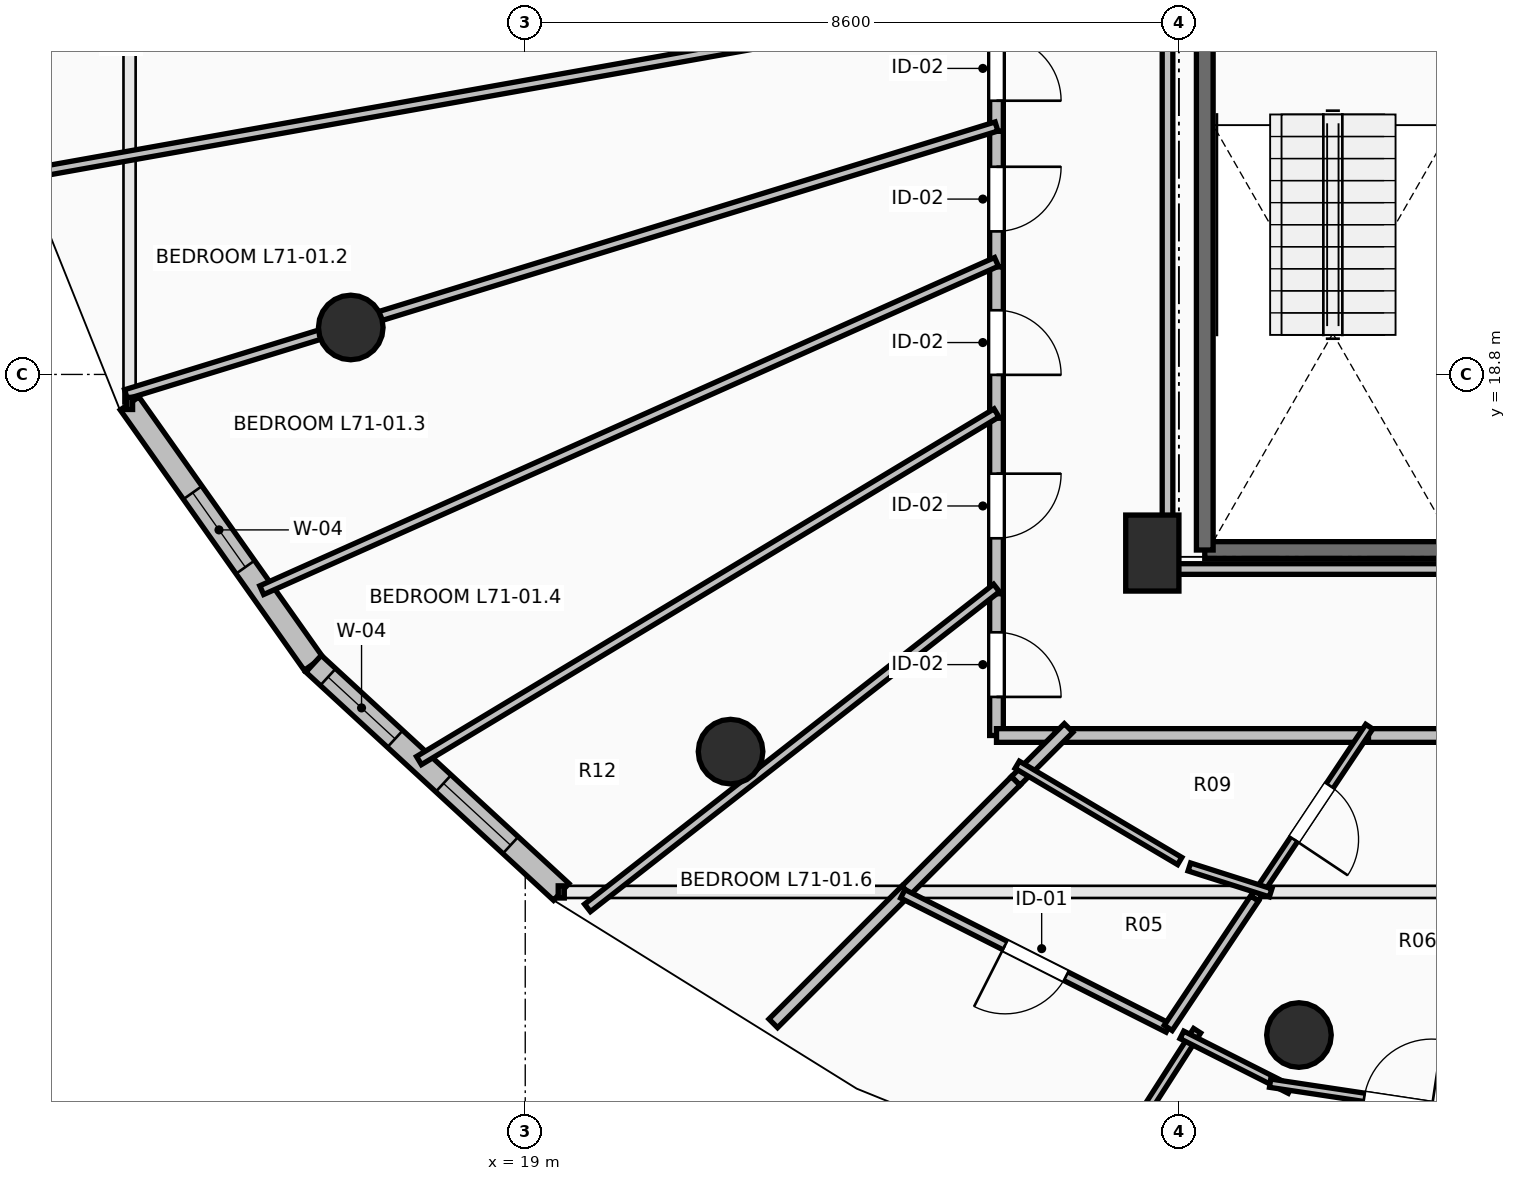
"""IFC4 building model, lengths in metres.
Left out: names, types, materials, properties, quantities, classifications, styles, units other than length and angle.
Written with IfcOpenShell. Run it as: python <this file> out.ifc"""

import sys

from ifc_helpers import new_model, si_unit, direction, frame, frame_2d, origin, origin_2d, place, context, subcontext, project, spatial, rectangle, circle, extrude, element, fill, save


model = new_model("IFC4")
c1 = context("Model", 3, precision=1e-05, world=origin(), true_north=direction((0.0, 1.0)))
c2 = subcontext(c1, "Body", "Model", "MODEL_VIEW")
j1 = project(units=[si_unit("LENGTHUNIT", "METRE"), si_unit("PLANEANGLEUNIT", "RADIAN")], contexts=[c1])
p1 = place(None, origin())
s1 = spatial("IfcSite", under=j1, at=p1, CompositionType="ELEMENT")
p2 = place(p1, origin())
s2 = spatial("IfcBuilding", under=s1, at=p2, CompositionType="ELEMENT")
p3 = place(p2, frame((0.0, 0.0, 262.65)))
s3 = spatial("IfcBuildingStorey", under=s2, at=p3, CompositionType="ELEMENT", Elevation=262.65)
for number, where, z_axis, x_axis in (
    (1, (16.705, 19.418, 0.0), (0.0, 0.0, 1.0), (-0.924, -0.383, 0.0)),
    (2, (21.701, 13.838, 0.0), (0.0, 0.0, 1.0), (-0.707, -0.707, 0.0)),
    (3, (29.179, 10.109, 0.0), (0.0, 0.0, 1.0), (-0.383, -0.924, 0.0)),
):
    element("IfcColumn", number, at=place(p3, frame(where, z_axis=z_axis, x_axis=x_axis)), inside=s3, PredefinedType="COLUMN", context=c2, shape_type="SweptSolid", body=[
        extrude(circle(Radius=0.425, at=origin_2d()), origin(), (0.0, 0.0, 1.0), 3.55),
    ])
p4 = place(p3, frame((27.25, 16.45, 0.0), z_axis=(0.0, 0.0, 1.0), x_axis=(1.0, 0.0, 0.0)))
e4 = element("IfcColumn", 4, at=p4, inside=s3, PredefinedType="PILASTER", context=c2, shape_type="SweptSolid", body=[
    extrude(rectangle(XDim=0.7, YDim=1.0, at=origin_2d()), origin(), (0.0, 0.0, 1.0), 3.55),
])
p5 = place(p3, frame((13.794, 18.419, 0.0), z_axis=(0.0, 0.0, 1.0), x_axis=(0.577261247247, -0.816559521668, 0.0)))
e5 = element("IfcWall", 5, at=p5, inside=s3, PredefinedType="STANDARD", context=c2, shape_type="SweptSolid", body=[
    extrude(rectangle(XDim=4.194, YDim=0.3, at=frame_2d((2.097, 0.0))), origin(), (0.0, 0.0, 1.0), 3.29),
])
p6 = place(p5, frame((1.438, 0.0, 0.85)))
e6 = element("IfcOpeningElement", 6, at=p6, cuts=e5, PredefinedType="OPENING", context=c2, shape_type="SweptSolid", body=[
    extrude(rectangle(XDim=1.2, YDim=1.95, at=frame_2d((0.6, 0.975))), frame((0.0, 0.165, 0.0), z_axis=(0.0, -1.0, 0.0), x_axis=(1.0, 0.0, 0.0)), (0.0, 0.0, 1.0), 0.33),
])
p7 = place(p3, frame((16.216, 14.994, 0.0), z_axis=(0.0, 0.0, 1.0), x_axis=(0.735445373611, -0.677584018727, 0.0)))
e7 = element("IfcWall", 7, at=p7, inside=s3, PredefinedType="STANDARD", context=c2, shape_type="SweptSolid", body=[
    extrude(rectangle(XDim=4.43, YDim=0.3, at=frame_2d((2.215, 0.0))), origin(), (0.0, 0.0, 1.0), 3.29),
])
p8 = place(p7, frame((0.258, 0.0, 0.85)))
e8 = element("IfcOpeningElement", 8, at=p8, cuts=e7, PredefinedType="OPENING", context=c2, shape_type="SweptSolid", body=[
    extrude(rectangle(XDim=1.2, YDim=1.95, at=frame_2d((0.6, 0.975))), frame((0.0, 0.165, 0.0), z_axis=(0.0, -1.0, 0.0), x_axis=(1.0, 0.0, 0.0)), (0.0, 0.0, 1.0), 0.33),
])
p9 = place(p7, frame((2.323, 0.0, 0.85)))
e9 = element("IfcOpeningElement", 9, at=p9, cuts=e7, PredefinedType="OPENING", context=c2, shape_type="SweptSolid", body=[
    extrude(rectangle(XDim=1.2, YDim=1.95, at=frame_2d((0.6, 0.975))), frame((0.0, 0.165, 0.0), z_axis=(0.0, -1.0, 0.0), x_axis=(1.0, 0.0, 0.0)), (0.0, 0.0, 1.0), 0.33),
])
p10 = place(p3, frame((31.31, 16.49, 0.0), z_axis=(0.0, 0.0, 1.0), x_axis=(-1.0, 0.0, 0.0)))
e10 = element("IfcWall", 10, at=p10, inside=s3, PredefinedType="SOLIDWALL", context=c2, shape_type="SweptSolid", body=[
    extrude(rectangle(XDim=3.37, YDim=0.22, at=frame_2d((1.685, 0.0))), origin(), (0.0, 0.0, 1.0), 3.29),
])
p11 = place(p3, frame((27.94, 16.49, 0.0), z_axis=(0.0, 0.0, 1.0), x_axis=(0.0, 1.0, 0.0)))
e11 = element("IfcWall", 11, at=p11, inside=s3, PredefinedType="SOLIDWALL", context=c2, shape_type="SweptSolid", body=[
    extrude(rectangle(XDim=7.42, YDim=0.22, at=frame_2d((3.71, 0.0))), origin(), (0.0, 0.0, 1.0), 3.29),
])
p12 = place(p3, frame((25.2, 23.653, 0.0), z_axis=(0.0, 0.0, 1.0), x_axis=(0.0, -1.0, 0.0)))
e12 = element("IfcWall", 12, at=p12, inside=s3, PredefinedType="PARTITIONING", context=c2, shape_type="SweptSolid", body=[
    extrude(rectangle(XDim=1.654, YDim=0.18, at=frame_2d((0.827, 0.0))), origin(), (0.0, 0.0, 1.0), 3.29),
])
p13 = place(p12, frame((0.402, 0.0, 0.0)))
e13 = element("IfcOpeningElement", 13, at=p13, cuts=e12, PredefinedType="OPENING", context=c2, shape_type="SweptSolid", body=[
    extrude(rectangle(XDim=0.85, YDim=2.1, at=frame_2d((0.425, 1.05))), frame((0.0, 0.105, 0.0), z_axis=(0.0, -1.0, 0.0), x_axis=(1.0, 0.0, 0.0)), (0.0, 0.0, 1.0), 0.21),
])
p14 = place(p3, frame((25.2, 21.999, 0.0), z_axis=(0.0, 0.0, 1.0), x_axis=(0.0, -1.0, 0.0)))
e14 = element("IfcWall", 14, at=p14, inside=s3, PredefinedType="PARTITIONING", context=c2, shape_type="SweptSolid", body=[
    extrude(rectangle(XDim=1.784, YDim=0.18, at=frame_2d((0.892, 0.0))), origin(), (0.0, 0.0, 1.0), 3.29),
])
p15 = place(p14, frame((0.467, 0.0, 0.0)))
e15 = element("IfcOpeningElement", 15, at=p15, cuts=e14, PredefinedType="OPENING", context=c2, shape_type="SweptSolid", body=[
    extrude(rectangle(XDim=0.85, YDim=2.1, at=frame_2d((0.425, 1.05))), frame((0.0, 0.105, 0.0), z_axis=(0.0, -1.0, 0.0), x_axis=(1.0, 0.0, 0.0)), (0.0, 0.0, 1.0), 0.21),
])
p16 = place(p3, frame((25.2, 20.215, 0.0), z_axis=(0.0, 0.0, 1.0), x_axis=(0.0, -1.0, 0.0)))
e16 = element("IfcWall", 16, at=p16, inside=s3, PredefinedType="PARTITIONING", context=c2, shape_type="SweptSolid", body=[
    extrude(rectangle(XDim=1.991, YDim=0.18, at=frame_2d((0.996, 0.0))), origin(), (0.0, 0.0, 1.0), 3.29),
])
p17 = place(p16, frame((0.571, 0.0, 0.0)))
e17 = element("IfcOpeningElement", 17, at=p17, cuts=e16, PredefinedType="OPENING", context=c2, shape_type="SweptSolid", body=[
    extrude(rectangle(XDim=0.85, YDim=2.1, at=frame_2d((0.425, 1.05))), frame((0.0, 0.105, 0.0), z_axis=(0.0, -1.0, 0.0), x_axis=(1.0, 0.0, 0.0)), (0.0, 0.0, 1.0), 0.21),
])
p18 = place(p3, frame((25.2, 18.224, 0.0), z_axis=(0.0, 0.0, 1.0), x_axis=(0.0, -1.0, 0.0)))
e18 = element("IfcWall", 18, at=p18, inside=s3, PredefinedType="PARTITIONING", context=c2, shape_type="SweptSolid", body=[
    extrude(rectangle(XDim=2.309, YDim=0.18, at=frame_2d((1.155, 0.0))), origin(), (0.0, 0.0, 1.0), 2.482),
])
p19 = place(p18, frame((0.729, 0.0, 0.0)))
e19 = element("IfcOpeningElement", 19, at=p19, cuts=e18, PredefinedType="OPENING", context=c2, shape_type="SweptSolid", body=[
    extrude(rectangle(XDim=0.85, YDim=2.1, at=frame_2d((0.425, 1.05))), frame((0.0, 0.105, 0.0), z_axis=(0.0, -1.0, 0.0), x_axis=(1.0, 0.0, 0.0)), (0.0, 0.0, 1.0), 0.21),
])
p20 = place(p3, frame((25.2, 15.915, 0.0), z_axis=(0.0, 0.0, 1.0), x_axis=(0.0, -1.0, 0.0)))
e20 = element("IfcWall", 20, at=p20, inside=s3, PredefinedType="PARTITIONING", context=c2, shape_type="SweptSolid", body=[
    extrude(rectangle(XDim=1.865, YDim=0.18, at=frame_2d((0.933, 0.0))), origin(), (0.0, 0.0, 1.0), 2.482),
])
p21 = place(p20, frame((0.508, 0.0, 0.0)))
e21 = element("IfcOpeningElement", 21, at=p21, cuts=e20, PredefinedType="OPENING", context=c2, shape_type="SweptSolid", body=[
    extrude(rectangle(XDim=0.85, YDim=2.1, at=frame_2d((0.425, 1.05))), frame((0.0, 0.105, 0.0), z_axis=(0.0, -1.0, 0.0), x_axis=(1.0, 0.0, 0.0)), (0.0, 0.0, 1.0), 0.21),
])
p22 = place(p3, frame((25.2, 14.05, 0.0), z_axis=(0.0, 0.0, 1.0), x_axis=(1.0, 0.0, 0.0)))
e22 = element("IfcWall", 22, at=p22, inside=s3, PredefinedType="PARTITIONING", context=c2, shape_type="SweptSolid", body=[
    extrude(rectangle(XDim=0.91, YDim=0.18, at=frame_2d((0.455, 0.0))), origin(), (0.0, 0.0, 1.0), 3.022),
])
p23 = place(p3, frame((29.954, 14.05, 0.0), z_axis=(0.0, 0.0, 1.0), x_axis=(1.0, 0.0, 0.0)))
e23 = element("IfcWall", 23, at=p23, inside=s3, PredefinedType="PARTITIONING", context=c2, shape_type="SweptSolid", body=[
    extrude(rectangle(XDim=3.909, YDim=0.18, at=frame_2d((1.955, 0.0))), origin(), (0.0, 0.0, 1.0), 2.936),
])
p24 = place(p23, frame((1.455, 0.0, 0.0)))
e24 = element("IfcOpeningElement", 24, at=p24, cuts=e23, PredefinedType="OPENING", context=c2, shape_type="SweptSolid", body=[
    extrude(rectangle(XDim=1.0, YDim=2.15, at=frame_2d((0.5, 1.075))), frame((0.0, 0.105, 0.0), z_axis=(0.0, -1.0, 0.0), x_axis=(1.0, 0.0, 0.0)), (0.0, 0.0, 1.0), 0.21),
])
p25 = place(p3, frame((25.97, 14.05, 0.0), z_axis=(0.0, 0.0, 1.0), x_axis=(1.0, 0.0, 0.0)))
e25 = element("IfcWall", 25, at=p25, inside=s3, PredefinedType="PARTITIONING", context=c2, shape_type="SweptSolid", body=[
    extrude(rectangle(XDim=4.124, YDim=0.18, at=frame_2d((2.062, 0.0))), origin(), (0.0, 0.0, 1.0), 2.482),
])
p26 = place(p3, frame((12.577, 21.46, 0.0), z_axis=(0.0, 0.0, 1.0), x_axis=(0.984427104809, 0.175793274383, 0.0)))
e26 = element("IfcWall", 26, at=p26, inside=s3, PredefinedType="PARTITIONING", context=c2, shape_type="SweptSolid", body=[
    extrude(rectangle(XDim=12.823, YDim=0.125, at=frame_2d((6.411, 0.0))), origin(), (0.0, 0.0, 1.0), 2.874),
])
p27 = place(p3, frame((13.747, 18.539, 0.0), z_axis=(0.0, 0.0, 1.0), x_axis=(0.955802794564, 0.294008533725, 0.0)))
e27 = element("IfcWall", 27, at=p27, inside=s3, PredefinedType="PARTITIONING", context=c2, shape_type="SweptSolid", body=[
    extrude(rectangle(XDim=11.982, YDim=0.125, at=frame_2d((5.991, 0.0))), origin(), (0.0, 0.0, 1.0), 2.482),
])
p28 = place(p3, frame((15.533, 15.962, 0.0), z_axis=(0.0, 0.0, 1.0), x_axis=(0.913015836792, 0.407924112756, 0.0)))
e28 = element("IfcWall", 28, at=p28, inside=s3, PredefinedType="PARTITIONING", context=c2, shape_type="SweptSolid", body=[
    extrude(rectangle(XDim=10.588, YDim=0.125, at=frame_2d((5.294, 0.0))), origin(), (0.0, 0.0, 1.0), 2.482),
])
p29 = place(p3, frame((17.602, 13.72, 0.0), z_axis=(0.0, 0.0, 1.0), x_axis=(0.856734134601, 0.515758298633, 0.0)))
e29 = element("IfcWall", 29, at=p29, inside=s3, PredefinedType="PARTITIONING", context=c2, shape_type="SweptSolid", body=[
    extrude(rectangle(XDim=8.868, YDim=0.125, at=frame_2d((4.434, 0.0))), origin(), (0.0, 0.0, 1.0), 2.482),
])
p30 = place(p3, frame((19.819, 11.782, 0.0), z_axis=(0.0, 0.0, 1.0), x_axis=(0.78765580417, 0.61611552014, 0.0)))
e30 = element("IfcWall", 30, at=p30, inside=s3, PredefinedType="PARTITIONING", context=c2, shape_type="SweptSolid", body=[
    extrude(rectangle(XDim=6.832, YDim=0.125, at=frame_2d((3.416, 0.0))), origin(), (0.0, 0.0, 1.0), 2.482),
])
p31 = place(p3, frame((22.263, 10.263, 0.0), z_axis=(0.0, 0.0, 1.0), x_axis=(0.707106781187, 0.707106781187, 0.0)))
e31 = element("IfcWall", 31, at=p31, inside=s3, PredefinedType="PARTITIONING", context=c2, shape_type="SweptSolid", body=[
    extrude(rectangle(XDim=2.473, YDim=0.16, at=frame_2d((1.237, 0.0))), origin(), (0.0, 0.0, 1.0), 3.29),
])
p32 = place(p3, frame((25.452, 13.452, 0.0), z_axis=(0.0, 0.0, 1.0), x_axis=(0.707106781187, 0.707106781187, 0.0)))
e32 = element("IfcWall", 32, at=p32, inside=s3, PredefinedType="PARTITIONING", context=c2, shape_type="SweptSolid", body=[
    extrude(rectangle(XDim=0.986, YDim=0.16, at=frame_2d((0.493, 0.0))), origin(), (0.0, 0.0, 1.0), 3.022),
])
p33 = place(p3, frame((24.012, 12.012, 0.0), z_axis=(0.0, 0.0, 1.0), x_axis=(0.707106781187, 0.707106781187, 0.0)))
e33 = element("IfcWall", 33, at=p33, inside=s3, PredefinedType="PARTITIONING", context=c2, shape_type="SweptSolid", body=[
    extrude(rectangle(XDim=2.036, YDim=0.16, at=frame_2d((1.018, 0.0))), origin(), (0.0, 0.0, 1.0), 2.874),
])
p34 = place(p3, frame((30.104, 14.167, 0.0), z_axis=(0.0, 0.0, 1.0), x_axis=(-0.555011080332, -0.831842954354, 0.0)))
e34 = element("IfcWall", 34, at=p34, inside=s3, PredefinedType="PARTITIONING", context=c2, shape_type="SweptSolid", body=[
    extrude(rectangle(XDim=2.718, YDim=0.11, at=frame_2d((1.359, 0.0))), origin(), (0.0, 0.0, 1.0), 2.482),
])
p35 = place(p34, frame((0.934, 0.0, 0.0)))
e35 = element("IfcOpeningElement", 35, at=p35, cuts=e34, PredefinedType="OPENING", context=c2, shape_type="SweptSolid", body=[
    extrude(rectangle(XDim=0.85, YDim=2.1, at=frame_2d((0.425, 1.05))), frame((0.0, 0.07, 0.0), z_axis=(0.0, -1.0, 0.0), x_axis=(1.0, 0.0, 0.0)), (0.0, 0.0, 1.0), 0.14),
])
p36 = place(p3, frame((26.534, 8.132, 0.0), z_axis=(0.0, 0.0, 1.0), x_axis=(0.540114041626, 0.841591838149, 0.0)))
e36 = element("IfcWall", 36, at=p36, inside=s3, PredefinedType="PARTITIONING", context=c2, shape_type="SweptSolid", body=[
    extrude(rectangle(XDim=2.417, YDim=0.11, at=frame_2d((1.208, 0.0))), origin(), (0.0, 0.0, 1.0), 3.29),
])
p37 = place(p3, frame((27.639, 10.111, 0.0), z_axis=(0.0, 0.0, 1.0), x_axis=(0.892614165752, -0.45082141819, 0.0)))
e37 = element("IfcWall", 37, at=p37, inside=s3, PredefinedType="PARTITIONING", context=c2, shape_type="SweptSolid", body=[
    extrude(rectangle(XDim=1.595, YDim=0.11, at=frame_2d((0.798, 0.0))), origin(), (0.0, 0.0, 1.0), 3.29),
])
p38 = place(p3, frame((28.8, 9.476, 0.0), z_axis=(0.0, 0.0, 1.0), x_axis=(0.988903707347, -0.148557926731, 0.0)))
e38 = element("IfcWall", 38, at=p38, inside=s3, PredefinedType="PARTITIONING", context=c2, shape_type="SweptSolid", body=[
    extrude(rectangle(XDim=3.404, YDim=0.11, at=frame_2d((1.702, 0.0))), origin(), (0.0, 0.0, 1.0), 3.29),
])
p39 = place(p38, frame((1.252, 0.0, 0.0)))
e39 = element("IfcOpeningElement", 39, at=p39, cuts=e38, PredefinedType="OPENING", context=c2, shape_type="SweptSolid", body=[
    extrude(rectangle(XDim=0.9, YDim=2.1, at=frame_2d((0.45, 1.05))), frame((0.0, 0.07, 0.0), z_axis=(0.0, -1.0, 0.0), x_axis=(1.0, 0.0, 0.0)), (0.0, 0.0, 1.0), 0.14),
])
p40 = place(p3, frame((27.459, 10.203, 0.0), z_axis=(0.0, 0.0, 1.0), x_axis=(-0.892559828496, 0.450928988374, 0.0)))
e40 = element("IfcWall", 40, at=p40, inside=s3, PredefinedType="PARTITIONING", context=c2, shape_type="SweptSolid", body=[
    extrude(rectangle(XDim=3.912, YDim=0.125, at=frame_2d((1.956, 0.0))), origin(), (0.0, 0.0, 1.0), 3.29),
])
p41 = place(p40, frame((1.506, 0.0, 0.0)))
e41 = element("IfcOpeningElement", 41, at=p41, cuts=e40, PredefinedType="OPENING", context=c2, shape_type="SweptSolid", body=[
    extrude(rectangle(XDim=0.9, YDim=2.1, at=frame_2d((0.45, 1.05))), frame((0.0, 0.077, 0.0), z_axis=(0.0, -1.0, 0.0), x_axis=(1.0, 0.0, 0.0)), (0.0, 0.0, 1.0), 0.155),
])
p42 = place(p3, frame((28.595, 11.906, 0.0), z_axis=(0.0, 0.0, 1.0), x_axis=(-0.555085472594, -0.831793314541, 0.0)))
e42 = element("IfcWall", 42, at=p42, inside=s3, PredefinedType="PARTITIONING", context=c2, shape_type="SweptSolid", body=[
    extrude(rectangle(XDim=2.047, YDim=0.125, at=frame_2d((1.023, 0.0))), origin(), (0.0, 0.0, 1.0), 2.482),
])
p43 = place(p3, frame((25.472, 13.664, 0.0), z_axis=(0.0, 0.0, 1.0), x_axis=(0.860546797705, -0.509371386082, 0.0)))
e43 = element("IfcWall", 43, at=p43, inside=s3, PredefinedType="PARTITIONING", context=c2, shape_type="SweptSolid", body=[
    extrude(rectangle(XDim=2.485, YDim=0.11, at=frame_2d((1.242, 0.0))), origin(), (0.0, 0.0, 1.0), 3.022),
])
p44 = place(p3, frame((27.737, 12.321, 0.0), z_axis=(0.0, 0.0, 1.0), x_axis=(0.952754298981, -0.303742071127, 0.0)))
e44 = element("IfcWall", 44, at=p44, inside=s3, PredefinedType="PARTITIONING", context=c2, shape_type="SweptSolid", body=[
    extrude(rectangle(XDim=1.123, YDim=0.11, at=frame_2d((0.562, 0.0))), origin(), (0.0, 0.0, 1.0), 2.482),
])
p45 = place(p3, frame((27.45, 23.754, 0.0), z_axis=(0.0, 0.0, 1.0), x_axis=(0.0, -1.0, 0.0)))
e45 = element("IfcWall", 45, at=p45, inside=s3, PredefinedType="PARTITIONING", context=c2, shape_type="SweptSolid", body=[
    extrude(rectangle(XDim=7.514, YDim=0.14, at=frame_2d((3.757, 0.0))), origin(), (0.0, 0.0, 1.0), 2.482),
])
p46 = place(p3, frame((27.45, 16.24, 0.0), z_axis=(0.0, 0.0, 1.0), x_axis=(1.0, 0.0, 0.0)))
e46 = element("IfcWall", 46, at=p46, inside=s3, PredefinedType="PARTITIONING", context=c2, shape_type="SweptSolid", body=[
    extrude(rectangle(XDim=3.745, YDim=0.14, at=frame_2d((1.873, 0.0))), origin(), (0.0, 0.0, 1.0), 2.482),
])
p47 = place(p6, origin())
e47 = element("IfcWindow", 47, at=p47, inside=s3, PartitioningType="SINGLE_PANEL", PredefinedType="WINDOW", context=c2, shape_type="SweptSolid", body=[
    extrude(rectangle(XDim=1.2, YDim=1.95, at=frame_2d((0.6, 0.975))), frame((0.0, 0.03, 0.0), z_axis=(0.0, -1.0, 0.0), x_axis=(1.0, 0.0, 0.0)), (0.0, 0.0, 1.0), 0.06),
])
fill(e6, e47)
p48 = place(p8, origin())
e48 = element("IfcWindow", 48, at=p48, inside=s3, PartitioningType="SINGLE_PANEL", PredefinedType="WINDOW", context=c2, shape_type="SweptSolid", body=[
    extrude(rectangle(XDim=1.2, YDim=1.95, at=frame_2d((0.6, 0.975))), frame((0.0, 0.03, 0.0), z_axis=(0.0, -1.0, 0.0), x_axis=(1.0, 0.0, 0.0)), (0.0, 0.0, 1.0), 0.06),
])
fill(e8, e48)
p49 = place(p9, origin())
e49 = element("IfcWindow", 49, at=p49, inside=s3, PartitioningType="SINGLE_PANEL", PredefinedType="WINDOW", context=c2, shape_type="SweptSolid", body=[
    extrude(rectangle(XDim=1.2, YDim=1.95, at=frame_2d((0.6, 0.975))), frame((0.0, 0.03, 0.0), z_axis=(0.0, -1.0, 0.0), x_axis=(1.0, 0.0, 0.0)), (0.0, 0.0, 1.0), 0.06),
])
fill(e9, e49)
p50 = place(p35, origin())
e50 = element("IfcDoor", 50, at=p50, inside=s3, OperationType="SINGLE_SWING_RIGHT", PredefinedType="DOOR", context=c2, shape_type="SweptSolid", body=[
    extrude(rectangle(XDim=0.85, YDim=2.1, at=frame_2d((0.425, 1.05))), frame((0.0, 0.025, 0.0), z_axis=(0.0, -1.0, 0.0), x_axis=(1.0, 0.0, 0.0)), (0.0, 0.0, 1.0), 0.05),
])
fill(e35, e50)
p51 = place(p39, origin())
e51 = element("IfcDoor", 51, at=p51, inside=s3, OperationType="SINGLE_SWING_RIGHT", PredefinedType="DOOR", context=c2, shape_type="SweptSolid", body=[
    extrude(rectangle(XDim=0.9, YDim=2.1, at=frame_2d((0.45, 1.05))), frame((0.0, 0.025, 0.0), z_axis=(0.0, -1.0, 0.0), x_axis=(1.0, 0.0, 0.0)), (0.0, 0.0, 1.0), 0.05),
])
fill(e39, e51)
p52 = place(p41, origin())
e52 = element("IfcDoor", 52, at=p52, inside=s3, OperationType="SINGLE_SWING_RIGHT", PredefinedType="DOOR", context=c2, shape_type="SweptSolid", body=[
    extrude(rectangle(XDim=0.9, YDim=2.1, at=frame_2d((0.45, 1.05))), frame((0.0, 0.025, 0.0), z_axis=(0.0, -1.0, 0.0), x_axis=(1.0, 0.0, 0.0)), (0.0, 0.0, 1.0), 0.05),
])
fill(e41, e52)
p53 = place(p13, origin())
e53 = element("IfcDoor", 53, at=p53, inside=s3, OperationType="SINGLE_SWING_RIGHT", PredefinedType="DOOR", context=c2, shape_type="SweptSolid", body=[
    extrude(rectangle(XDim=0.85, YDim=2.1, at=frame_2d((0.425, 1.05))), frame((0.0, 0.025, 0.0), z_axis=(0.0, -1.0, 0.0), x_axis=(1.0, 0.0, 0.0)), (0.0, 0.0, 1.0), 0.05),
])
fill(e13, e53)
p54 = place(p15, origin())
e54 = element("IfcDoor", 54, at=p54, inside=s3, OperationType="SINGLE_SWING_LEFT", PredefinedType="DOOR", context=c2, shape_type="SweptSolid", body=[
    extrude(rectangle(XDim=0.85, YDim=2.1, at=frame_2d((0.425, 1.05))), frame((0.0, 0.025, 0.0), z_axis=(0.0, -1.0, 0.0), x_axis=(1.0, 0.0, 0.0)), (0.0, 0.0, 1.0), 0.05),
])
fill(e15, e54)
p55 = place(p17, origin())
e55 = element("IfcDoor", 55, at=p55, inside=s3, OperationType="SINGLE_SWING_RIGHT", PredefinedType="DOOR", context=c2, shape_type="SweptSolid", body=[
    extrude(rectangle(XDim=0.85, YDim=2.1, at=frame_2d((0.425, 1.05))), frame((0.0, 0.025, 0.0), z_axis=(0.0, -1.0, 0.0), x_axis=(1.0, 0.0, 0.0)), (0.0, 0.0, 1.0), 0.05),
])
fill(e17, e55)
p56 = place(p19, origin())
e56 = element("IfcDoor", 56, at=p56, inside=s3, OperationType="SINGLE_SWING_LEFT", PredefinedType="DOOR", context=c2, shape_type="SweptSolid", body=[
    extrude(rectangle(XDim=0.85, YDim=2.1, at=frame_2d((0.425, 1.05))), frame((0.0, 0.025, 0.0), z_axis=(0.0, -1.0, 0.0), x_axis=(1.0, 0.0, 0.0)), (0.0, 0.0, 1.0), 0.05),
])
fill(e19, e56)
p57 = place(p21, origin())
e57 = element("IfcDoor", 57, at=p57, inside=s3, OperationType="SINGLE_SWING_RIGHT", PredefinedType="DOOR", context=c2, shape_type="SweptSolid", body=[
    extrude(rectangle(XDim=0.85, YDim=2.1, at=frame_2d((0.425, 1.05))), frame((0.0, 0.025, 0.0), z_axis=(0.0, -1.0, 0.0), x_axis=(1.0, 0.0, 0.0)), (0.0, 0.0, 1.0), 0.05),
])
fill(e21, e57)
save(model, sys.argv[1])
